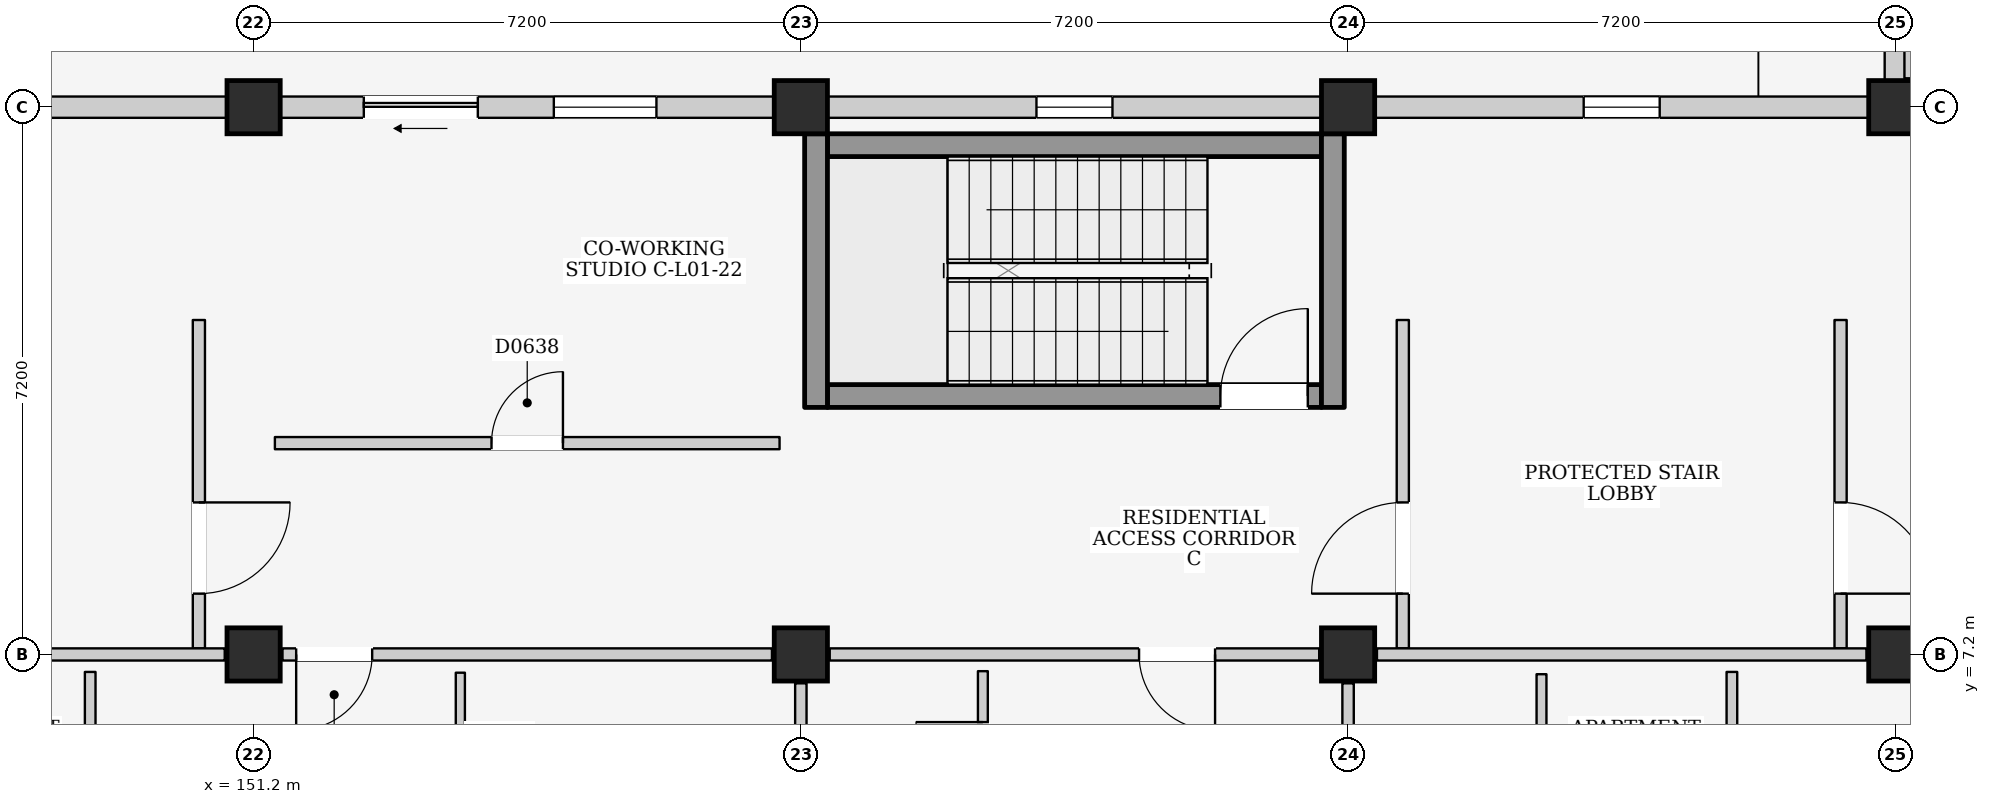
"""IFC4 building model, lengths in metres.
Left out: names, types, materials, properties, quantities, classifications, styles, units other than length and angle.
Written with IfcOpenShell. Run it as: python <this file> out.ifc"""

import sys

from ifc_helpers import new_model, si_unit, direction, frame, frame_2d, origin, origin_2d, place, context, subcontext, project, spatial, rectangle, extrude, element, fill, save


model = new_model("IFC4")
c1 = context("Model", 3, precision=1e-05, world=origin(), true_north=direction((0.0, 1.0)))
c2 = subcontext(c1, "Body", "Model", "MODEL_VIEW")
j1 = project(units=[si_unit("LENGTHUNIT", "METRE"), si_unit("PLANEANGLEUNIT", "RADIAN")], contexts=[c1])
p1 = place(None, origin())
s1 = spatial("IfcSite", under=j1, at=p1, CompositionType="ELEMENT")
p2 = place(p1, origin())
s2 = spatial("IfcBuilding", under=s1, at=p2, CompositionType="ELEMENT")
p3 = place(p2, frame((0.0, 0.0, 4.5)))
s3 = spatial("IfcBuildingStorey", under=s2, at=p3, CompositionType="ELEMENT", Elevation=4.5)
for number, where, z_axis, x_axis in (
    (1, (151.2, 7.2, 0.0), (0.0, 0.0, 1.0), (1.0, 0.0, 0.0)),
    (2, (151.2, 14.4, 0.0), (0.0, 0.0, 1.0), (1.0, 0.0, 0.0)),
    (3, (158.4, 7.2, 0.0), (0.0, 0.0, 1.0), (1.0, 0.0, 0.0)),
    (4, (158.4, 14.4, 0.0), (0.0, 0.0, 1.0), (1.0, 0.0, 0.0)),
    (5, (165.6, 7.2, 0.0), (0.0, 0.0, 1.0), (1.0, 0.0, 0.0)),
    (6, (165.6, 14.4, 0.0), (0.0, 0.0, 1.0), (1.0, 0.0, 0.0)),
    (7, (172.8, 7.2, 0.0), (0.0, 0.0, 1.0), (1.0, 0.0, 0.0)),
    (8, (172.8, 14.4, 0.0), (0.0, 0.0, 1.0), (1.0, 0.0, 0.0)),
):
    element("IfcColumn", number, at=place(p3, frame(where, z_axis=z_axis, x_axis=x_axis)), inside=s3, PredefinedType="COLUMN", context=c2, shape_type="SweptSolid", body=[
        extrude(rectangle(XDim=0.7, YDim=0.7, at=origin_2d()), origin(), (0.0, 0.0, 1.0), 4.5),
    ])
p4 = place(p3, frame((144.35, 14.4, 0.0), z_axis=(0.0, 0.0, 1.0), x_axis=(1.0, 0.0, 0.0)))
e9 = element("IfcWall", 9, at=p4, inside=s3, PredefinedType="ELEMENTEDWALL", context=c2, shape_type="SweptSolid", body=[
    extrude(rectangle(XDim=6.5, YDim=0.28, at=frame_2d((3.25, 0.0))), origin(), (0.0, 0.0, 1.0), 3.635),
])
p5 = place(p4, frame((2.75, 0.0, 1.2)))
e10 = element("IfcOpeningElement", 10, at=p5, cuts=e9, PredefinedType="OPENING", context=c2, shape_type="SweptSolid", body=[
    extrude(rectangle(XDim=1.0, YDim=0.9, at=frame_2d((0.5, 0.45))), frame((0.0, 0.155, 0.0), z_axis=(0.0, -1.0, 0.0), x_axis=(1.0, 0.0, 0.0)), (0.0, 0.0, 1.0), 0.31),
])
p6 = place(p3, frame((151.55, 14.4, 0.0), z_axis=(0.0, 0.0, 1.0), x_axis=(1.0, 0.0, 0.0)))
e11 = element("IfcWall", 11, at=p6, inside=s3, PredefinedType="ELEMENTEDWALL", context=c2, shape_type="SweptSolid", body=[
    extrude(rectangle(XDim=6.5, YDim=0.28, at=frame_2d((3.25, 0.0))), origin(), (0.0, 0.0, 1.0), 3.635),
])
p7 = place(p6, frame((1.1, 0.0, 0.0)))
e12 = element("IfcOpeningElement", 12, at=p7, cuts=e11, PredefinedType="OPENING", context=c2, shape_type="SweptSolid", body=[
    extrude(rectangle(XDim=1.5, YDim=2.12, at=frame_2d((0.75, 1.06))), frame((0.0, 0.155, 0.0), z_axis=(0.0, -1.0, 0.0), x_axis=(1.0, 0.0, 0.0)), (0.0, 0.0, 1.0), 0.31),
])
p8 = place(p6, frame((3.6, 0.0, 0.95)))
e13 = element("IfcOpeningElement", 13, at=p8, cuts=e11, PredefinedType="OPENING", context=c2, shape_type="SweptSolid", body=[
    extrude(rectangle(XDim=1.35, YDim=1.5, at=frame_2d((0.675, 0.75))), frame((0.0, 0.155, 0.0), z_axis=(0.0, -1.0, 0.0), x_axis=(1.0, 0.0, 0.0)), (0.0, 0.0, 1.0), 0.31),
])
p9 = place(p3, frame((158.75, 14.4, 0.0), z_axis=(0.0, 0.0, 1.0), x_axis=(1.0, 0.0, 0.0)))
e14 = element("IfcWall", 14, at=p9, inside=s3, PredefinedType="ELEMENTEDWALL", context=c2, shape_type="SweptSolid", body=[
    extrude(rectangle(XDim=6.5, YDim=0.28, at=frame_2d((3.25, 0.0))), origin(), (0.0, 0.0, 1.0), 3.635),
])
p10 = place(p9, frame((2.75, 0.0, 1.2)))
e15 = element("IfcOpeningElement", 15, at=p10, cuts=e14, PredefinedType="OPENING", context=c2, shape_type="SweptSolid", body=[
    extrude(rectangle(XDim=1.0, YDim=0.9, at=frame_2d((0.5, 0.45))), frame((0.0, 0.155, 0.0), z_axis=(0.0, -1.0, 0.0), x_axis=(1.0, 0.0, 0.0)), (0.0, 0.0, 1.0), 0.31),
])
p11 = place(p3, frame((165.95, 14.4, 0.0), z_axis=(0.0, 0.0, 1.0), x_axis=(1.0, 0.0, 0.0)))
e16 = element("IfcWall", 16, at=p11, inside=s3, PredefinedType="ELEMENTEDWALL", context=c2, shape_type="SweptSolid", body=[
    extrude(rectangle(XDim=6.5, YDim=0.28, at=frame_2d((3.25, 0.0))), origin(), (0.0, 0.0, 1.0), 3.635),
])
p12 = place(p11, frame((2.75, 0.0, 1.2)))
e17 = element("IfcOpeningElement", 17, at=p12, cuts=e16, PredefinedType="OPENING", context=c2, shape_type="SweptSolid", body=[
    extrude(rectangle(XDim=1.0, YDim=0.9, at=frame_2d((0.5, 0.45))), frame((0.0, 0.155, 0.0), z_axis=(0.0, -1.0, 0.0), x_axis=(1.0, 0.0, 0.0)), (0.0, 0.0, 1.0), 0.31),
])
p13 = place(p3, frame((172.8, 14.75, 0.0), z_axis=(0.0, 0.0, 1.0), x_axis=(0.0, 1.0, 0.0)))
e18 = element("IfcWall", 18, at=p13, inside=s3, PredefinedType="ELEMENTEDWALL", context=c2, shape_type="SweptSolid", body=[
    extrude(rectangle(XDim=6.5, YDim=0.28, at=frame_2d((3.25, 0.0))), origin(), (0.0, 0.0, 1.0), 3.685),
])
p14 = place(p13, frame((2.5, 0.0, 0.0)))
e19 = element("IfcOpeningElement", 19, at=p14, cuts=e18, PredefinedType="OPENING", context=c2, shape_type="SweptSolid", body=[
    extrude(rectangle(XDim=1.4, YDim=2.1, at=frame_2d((0.7, 1.05))), frame((0.0, 0.155, 0.0), z_axis=(0.0, -1.0, 0.0), x_axis=(1.0, 0.0, 0.0)), (0.0, 0.0, 1.0), 0.31),
])
p15 = place(p3, frame((150.48, 7.28, 0.0), z_axis=(0.0, 0.0, 1.0), x_axis=(0.0, 1.0, 0.0)))
e20 = element("IfcWall", 20, at=p15, inside=s3, PredefinedType="PARTITIONING", context=c2, shape_type="SweptSolid", body=[
    extrude(rectangle(XDim=4.32, YDim=0.16, at=frame_2d((2.16, 0.0))), origin(), (0.0, 0.0, 1.0), 4.25),
])
p16 = place(p15, frame((0.72, 0.0, 0.0)))
e21 = element("IfcOpeningElement", 21, at=p16, cuts=e20, PredefinedType="OPENING", context=c2, shape_type="SweptSolid", body=[
    extrude(rectangle(XDim=1.2, YDim=2.2, at=frame_2d((0.6, 1.1))), frame((0.0, 0.095, 0.0), z_axis=(0.0, -1.0, 0.0), x_axis=(1.0, 0.0, 0.0)), (0.0, 0.0, 1.0), 0.19),
])
p17 = place(p3, frame((158.75, 10.6, 0.0), z_axis=(0.0, 0.0, 1.0), x_axis=(1.0, 0.0, 0.0)))
e22 = element("IfcWall", 22, at=p17, inside=s3, PredefinedType="SHEAR", context=c2, shape_type="SweptSolid", body=[
    extrude(rectangle(XDim=6.5, YDim=0.3, at=frame_2d((3.25, 0.0))), origin(), (0.0, 0.0, 1.0), 4.25),
])
p18 = place(p17, frame((5.17, 0.0, 0.0)))
e23 = element("IfcOpeningElement", 23, at=p18, cuts=e22, PredefinedType="OPENING", context=c2, shape_type="SweptSolid", body=[
    extrude(rectangle(XDim=1.15, YDim=2.2, at=frame_2d((0.575, 1.1))), frame((0.0, 0.165, 0.0), z_axis=(0.0, -1.0, 0.0), x_axis=(1.0, 0.0, 0.0)), (0.0, 0.0, 1.0), 0.33),
])
p19 = place(p3, frame((158.75, 13.9, 0.0), z_axis=(0.0, 0.0, 1.0), x_axis=(1.0, 0.0, 0.0)))
e24 = element("IfcWall", 24, at=p19, inside=s3, PredefinedType="SHEAR", context=c2, shape_type="SweptSolid", body=[
    extrude(rectangle(XDim=6.5, YDim=0.3, at=frame_2d((3.25, 0.0))), origin(), (0.0, 0.0, 1.0), 4.25),
])
for number, where, z_axis, x_axis in (
    (25, (158.6, 10.45, 0.0), (0.0, 0.0, 1.0), (0.0, 1.0, 0.0)),
    (26, (165.4, 10.45, 0.0), (0.0, 0.0, 1.0), (0.0, 1.0, 0.0)),
):
    element("IfcWall", number, at=place(p3, frame(where, z_axis=z_axis, x_axis=x_axis)), inside=s3, PredefinedType="SHEAR", context=c2, shape_type="SweptSolid", body=[
        extrude(rectangle(XDim=3.6, YDim=0.3, at=frame_2d((1.8, 0.0))), origin(), (0.0, 0.0, 1.0), 4.25),
    ])
p20 = place(p3, frame((166.32, 7.28, 0.0), z_axis=(0.0, 0.0, 1.0), x_axis=(0.0, 1.0, 0.0)))
e27 = element("IfcWall", 27, at=p20, inside=s3, PredefinedType="PARTITIONING", context=c2, shape_type="SweptSolid", body=[
    extrude(rectangle(XDim=4.32, YDim=0.16, at=frame_2d((2.16, 0.0))), origin(), (0.0, 0.0, 1.0), 4.25),
])
p21 = place(p20, frame((0.72, 0.0, 0.0)))
e28 = element("IfcOpeningElement", 28, at=p21, cuts=e27, PredefinedType="OPENING", context=c2, shape_type="SweptSolid", body=[
    extrude(rectangle(XDim=1.2, YDim=2.2, at=frame_2d((0.6, 1.1))), frame((0.0, 0.095, 0.0), z_axis=(0.0, -1.0, 0.0), x_axis=(1.0, 0.0, 0.0)), (0.0, 0.0, 1.0), 0.19),
])
p22 = place(p3, frame((172.08, 7.28, 0.0), z_axis=(0.0, 0.0, 1.0), x_axis=(0.0, 1.0, 0.0)))
e29 = element("IfcWall", 29, at=p22, inside=s3, PredefinedType="PARTITIONING", context=c2, shape_type="SweptSolid", body=[
    extrude(rectangle(XDim=4.32, YDim=0.16, at=frame_2d((2.16, 0.0))), origin(), (0.0, 0.0, 1.0), 4.25),
])
p23 = place(p22, frame((0.72, 0.0, 0.0)))
e30 = element("IfcOpeningElement", 30, at=p23, cuts=e29, PredefinedType="OPENING", context=c2, shape_type="SweptSolid", body=[
    extrude(rectangle(XDim=1.2, YDim=2.2, at=frame_2d((0.6, 1.1))), frame((0.0, 0.095, 0.0), z_axis=(0.0, -1.0, 0.0), x_axis=(1.0, 0.0, 0.0)), (0.0, 0.0, 1.0), 0.19),
])
p24 = place(p3, frame((144.38, 7.2, 0.0), z_axis=(0.0, 0.0, 1.0), x_axis=(1.0, 0.0, 0.0)))
e31 = element("IfcWall", 31, at=p24, inside=s3, PredefinedType="PARTITIONING", context=c2, shape_type="SweptSolid", body=[
    extrude(rectangle(XDim=6.44, YDim=0.16, at=frame_2d((3.22, 0.0))), origin(), (0.0, 0.0, 1.0), 3.635),
])
p25 = place(p3, frame((151.58, 7.2, 0.0), z_axis=(0.0, 0.0, 1.0), x_axis=(1.0, 0.0, 0.0)))
e32 = element("IfcWall", 32, at=p25, inside=s3, PredefinedType="PARTITIONING", context=c2, shape_type="SweptSolid", body=[
    extrude(rectangle(XDim=6.44, YDim=0.16, at=frame_2d((3.22, 0.0))), origin(), (0.0, 0.0, 1.0), 3.635),
])
p26 = place(p25, frame((0.18, 0.0, 0.0)))
e33 = element("IfcOpeningElement", 33, at=p26, cuts=e32, PredefinedType="OPENING", context=c2, shape_type="SweptSolid", body=[
    extrude(rectangle(XDim=1.0, YDim=2.15, at=frame_2d((0.5, 1.075))), frame((0.0, 0.095, 0.0), z_axis=(0.0, -1.0, 0.0), x_axis=(1.0, 0.0, 0.0)), (0.0, 0.0, 1.0), 0.19),
])
p27 = place(p3, frame((158.4, 0.38, 0.0), z_axis=(0.0, 0.0, 1.0), x_axis=(0.0, 1.0, 0.0)))
e34 = element("IfcWall", 34, at=p27, inside=s3, PredefinedType="PARTITIONING", context=c2, shape_type="SweptSolid", body=[
    extrude(rectangle(XDim=6.44, YDim=0.15, at=frame_2d((3.22, 0.0))), origin(), (0.0, 0.0, 1.0), 3.685),
])
p28 = place(p3, frame((149.05, 3.91, 0.0), z_axis=(0.0, 0.0, 1.0), x_axis=(0.0, 1.0, 0.0)))
e35 = element("IfcWall", 35, at=p28, inside=s3, PredefinedType="PARTITIONING", context=c2, shape_type="SweptSolid", body=[
    extrude(rectangle(XDim=3.06, YDim=0.14, at=frame_2d((1.53, 0.0))), origin(), (0.0, 0.0, 1.0), 4.25),
])
p29 = place(p3, frame((153.92, 3.92, 0.0), z_axis=(0.0, 0.0, 1.0), x_axis=(0.0, 1.0, 0.0)))
e36 = element("IfcWall", 36, at=p29, inside=s3, PredefinedType="PARTITIONING", context=c2, shape_type="SweptSolid", body=[
    extrude(rectangle(XDim=3.04, YDim=0.12, at=frame_2d((1.52, 0.0))), origin(), (0.0, 0.0, 1.0), 4.25),
])
p30 = place(p29, frame((1.04, 0.0, 0.0)))
e37 = element("IfcOpeningElement", 37, at=p30, cuts=e36, PredefinedType="OPENING", context=c2, shape_type="SweptSolid", body=[
    extrude(rectangle(XDim=0.96, YDim=2.15, at=frame_2d((0.48, 1.075))), frame((0.0, 0.075, 0.0), z_axis=(0.0, -1.0, 0.0), x_axis=(1.0, 0.0, 0.0)), (0.0, 0.0, 1.0), 0.15),
])
p31 = place(p3, frame((158.78, 7.2, 0.0), z_axis=(0.0, 0.0, 1.0), x_axis=(1.0, 0.0, 0.0)))
e38 = element("IfcWall", 38, at=p31, inside=s3, PredefinedType="PARTITIONING", context=c2, shape_type="SweptSolid", body=[
    extrude(rectangle(XDim=6.44, YDim=0.16, at=frame_2d((3.22, 0.0))), origin(), (0.0, 0.0, 1.0), 3.635),
])
p32 = place(p31, frame((4.07, 0.0, 0.0)))
e39 = element("IfcOpeningElement", 39, at=p32, cuts=e38, PredefinedType="OPENING", context=c2, shape_type="SweptSolid", body=[
    extrude(rectangle(XDim=1.0, YDim=2.15, at=frame_2d((0.5, 1.075))), frame((0.0, 0.095, 0.0), z_axis=(0.0, -1.0, 0.0), x_axis=(1.0, 0.0, 0.0)), (0.0, 0.0, 1.0), 0.19),
])
p33 = place(p3, frame((165.6, 0.38, 0.0), z_axis=(0.0, 0.0, 1.0), x_axis=(0.0, 1.0, 0.0)))
e40 = element("IfcWall", 40, at=p33, inside=s3, PredefinedType="PARTITIONING", context=c2, shape_type="SweptSolid", body=[
    extrude(rectangle(XDim=6.44, YDim=0.15, at=frame_2d((3.22, 0.0))), origin(), (0.0, 0.0, 1.0), 3.685),
])
p34 = place(p3, frame((160.795, 4.76, 0.0), z_axis=(0.0, 0.0, 1.0), x_axis=(0.0, 1.0, 0.0)))
e41 = element("IfcWall", 41, at=p34, inside=s3, PredefinedType="PARTITIONING", context=c2, shape_type="SweptSolid", body=[
    extrude(rectangle(XDim=2.22, YDim=0.13, at=frame_2d((1.11, 0.0))), origin(), (0.0, 0.0, 1.0), 4.25),
])
p35 = place(p34, frame((0.67, 0.0, 0.0)))
e42 = element("IfcOpeningElement", 42, at=p35, cuts=e41, PredefinedType="OPENING", context=c2, shape_type="SweptSolid", body=[
    extrude(rectangle(XDim=0.88, YDim=2.1, at=frame_2d((0.44, 1.05))), frame((0.0, 0.08, 0.0), z_axis=(0.0, -1.0, 0.0), x_axis=(1.0, 0.0, 0.0)), (0.0, 0.0, 1.0), 0.16),
])
p36 = place(p3, frame((165.98, 7.2, 0.0), z_axis=(0.0, 0.0, 1.0), x_axis=(1.0, 0.0, 0.0)))
e43 = element("IfcWall", 43, at=p36, inside=s3, PredefinedType="PARTITIONING", context=c2, shape_type="SweptSolid", body=[
    extrude(rectangle(XDim=6.44, YDim=0.16, at=frame_2d((3.22, 0.0))), origin(), (0.0, 0.0, 1.0), 3.635),
])
p37 = place(p3, frame((168.145, 3.9, 0.0), z_axis=(0.0, 0.0, 1.0), x_axis=(0.0, 1.0, 0.0)))
e44 = element("IfcWall", 44, at=p37, inside=s3, PredefinedType="PARTITIONING", context=c2, shape_type="SweptSolid", body=[
    extrude(rectangle(XDim=3.04, YDim=0.13, at=frame_2d((1.52, 0.0))), origin(), (0.0, 0.0, 1.0), 4.25),
])
p38 = place(p3, frame((170.65, 3.91, 0.0), z_axis=(0.0, 0.0, 1.0), x_axis=(0.0, 1.0, 0.0)))
e45 = element("IfcWall", 45, at=p38, inside=s3, PredefinedType="PARTITIONING", context=c2, shape_type="SweptSolid", body=[
    extrude(rectangle(XDim=3.06, YDim=0.14, at=frame_2d((1.53, 0.0))), origin(), (0.0, 0.0, 1.0), 4.25),
])
p39 = place(p3, frame((151.48, 9.98, 0.0), z_axis=(0.0, 0.0, 1.0), x_axis=(1.0, 0.0, 0.0)))
e46 = element("IfcWall", 46, at=p39, inside=s3, PredefinedType="PARTITIONING", context=c2, shape_type="SweptSolid", body=[
    extrude(rectangle(XDim=6.64, YDim=0.16, at=frame_2d((3.32, 0.0))), origin(), (0.0, 0.0, 1.0), 4.25),
])
p40 = place(p39, frame((2.85, 0.0, 0.0)))
e47 = element("IfcOpeningElement", 47, at=p40, cuts=e46, PredefinedType="OPENING", context=c2, shape_type="SweptSolid", body=[
    extrude(rectangle(XDim=0.94, YDim=2.12, at=frame_2d((0.47, 1.06))), frame((0.0, 0.095, 0.0), z_axis=(0.0, -1.0, 0.0), x_axis=(1.0, 0.0, 0.0)), (0.0, 0.0, 1.0), 0.19),
])
p41 = place(p3, frame((173.0, 14.78, 0.0), z_axis=(0.0, 0.0, 1.0), x_axis=(0.0, 1.0, 0.0)))
e48 = element("IfcWall", 48, at=p41, inside=s3, PredefinedType="PARTITIONING", context=c2, shape_type="SweptSolid", body=[
    extrude(rectangle(XDim=6.44, YDim=0.16, at=frame_2d((3.22, 0.0))), origin(), (0.0, 0.0, 1.0), 3.685),
])
p42 = place(p41, frame((2.71, 0.0, 0.0)))
e49 = element("IfcOpeningElement", 49, at=p42, cuts=e48, PredefinedType="OPENING", context=c2, shape_type="SweptSolid", body=[
    extrude(rectangle(XDim=1.02, YDim=2.18, at=frame_2d((0.51, 1.09))), frame((0.0, 0.095, 0.0), z_axis=(0.0, -1.0, 0.0), x_axis=(1.0, 0.0, 0.0)), (0.0, 0.0, 1.0), 0.19),
])
p43 = place(p7, frame((1.5, 0.0, 0.0), z_axis=(0.0, 0.0, 1.0), x_axis=(-1.0, 0.0, 0.0)))
e50 = element("IfcDoor", 50, at=p43, inside=s3, OperationType="SLIDING_TO_LEFT", PredefinedType="DOOR", context=c2, shape_type="SweptSolid", body=[
    extrude(rectangle(XDim=1.5, YDim=2.12, at=frame_2d((0.75, 1.06))), frame((0.0, 0.025, 0.0), z_axis=(0.0, -1.0, 0.0), x_axis=(1.0, 0.0, 0.0)), (0.0, 0.0, 1.0), 0.05),
])
fill(e12, e50)
p44 = place(p8, origin())
e51 = element("IfcWindow", 51, at=p44, inside=s3, PartitioningType="SINGLE_PANEL", PredefinedType="WINDOW", context=c2, shape_type="SweptSolid", body=[
    extrude(rectangle(XDim=1.35, YDim=1.5, at=frame_2d((0.675, 0.75))), frame((0.0, 0.03, 0.0), z_axis=(0.0, -1.0, 0.0), x_axis=(1.0, 0.0, 0.0)), (0.0, 0.0, 1.0), 0.06),
])
fill(e13, e51)
p45 = place(p10, origin())
e52 = element("IfcWindow", 52, at=p45, inside=s3, PartitioningType="SINGLE_PANEL", PredefinedType="WINDOW", context=c2, shape_type="SweptSolid", body=[
    extrude(rectangle(XDim=1.0, YDim=0.9, at=frame_2d((0.5, 0.45))), frame((0.0, 0.03, 0.0), z_axis=(0.0, -1.0, 0.0), x_axis=(1.0, 0.0, 0.0)), (0.0, 0.0, 1.0), 0.06),
])
fill(e15, e52)
p46 = place(p12, origin())
e53 = element("IfcWindow", 53, at=p46, inside=s3, PartitioningType="SINGLE_PANEL", PredefinedType="WINDOW", context=c2, shape_type="SweptSolid", body=[
    extrude(rectangle(XDim=1.0, YDim=0.9, at=frame_2d((0.5, 0.45))), frame((0.0, 0.03, 0.0), z_axis=(0.0, -1.0, 0.0), x_axis=(1.0, 0.0, 0.0)), (0.0, 0.0, 1.0), 0.06),
])
fill(e17, e53)
p47 = place(p16, frame((1.2, 0.0, 0.0), z_axis=(0.0, 0.0, 1.0), x_axis=(-1.0, 0.0, 0.0)))
e54 = element("IfcDoor", 54, at=p47, inside=s3, OperationType="SINGLE_SWING_LEFT", PredefinedType="DOOR", context=c2, shape_type="SweptSolid", body=[
    extrude(rectangle(XDim=1.2, YDim=2.2, at=frame_2d((0.6, 1.1))), frame((0.0, 0.025, 0.0), z_axis=(0.0, -1.0, 0.0), x_axis=(1.0, 0.0, 0.0)), (0.0, 0.0, 1.0), 0.05),
])
fill(e21, e54)
p48 = place(p18, origin())
e55 = element("IfcDoor", 55, at=p48, inside=s3, OperationType="SINGLE_SWING_RIGHT", PredefinedType="DOOR", context=c2, shape_type="SweptSolid", body=[
    extrude(rectangle(XDim=1.15, YDim=2.2, at=frame_2d((0.575, 1.1))), frame((0.0, 0.025, 0.0), z_axis=(0.0, -1.0, 0.0), x_axis=(1.0, 0.0, 0.0)), (0.0, 0.0, 1.0), 0.05),
])
fill(e23, e55)
p49 = place(p21, origin())
e56 = element("IfcDoor", 56, at=p49, inside=s3, OperationType="SINGLE_SWING_LEFT", PredefinedType="DOOR", context=c2, shape_type="SweptSolid", body=[
    extrude(rectangle(XDim=1.2, YDim=2.2, at=frame_2d((0.6, 1.1))), frame((0.0, 0.025, 0.0), z_axis=(0.0, -1.0, 0.0), x_axis=(1.0, 0.0, 0.0)), (0.0, 0.0, 1.0), 0.05),
])
fill(e28, e56)
p50 = place(p23, frame((1.2, 0.0, 0.0), z_axis=(0.0, 0.0, 1.0), x_axis=(-1.0, 0.0, 0.0)))
e57 = element("IfcDoor", 57, at=p50, inside=s3, OperationType="SINGLE_SWING_RIGHT", PredefinedType="DOOR", context=c2, shape_type="SweptSolid", body=[
    extrude(rectangle(XDim=1.2, YDim=2.2, at=frame_2d((0.6, 1.1))), frame((0.0, 0.025, 0.0), z_axis=(0.0, -1.0, 0.0), x_axis=(1.0, 0.0, 0.0)), (0.0, 0.0, 1.0), 0.05),
])
fill(e30, e57)
p51 = place(p26, frame((1.0, 0.0, 0.0), z_axis=(0.0, 0.0, 1.0), x_axis=(-1.0, 0.0, 0.0)))
e58 = element("IfcDoor", 58, at=p51, inside=s3, OperationType="SINGLE_SWING_RIGHT", PredefinedType="DOOR", context=c2, shape_type="SweptSolid", body=[
    extrude(rectangle(XDim=1.0, YDim=2.15, at=frame_2d((0.5, 1.075))), frame((0.0, 0.025, 0.0), z_axis=(0.0, -1.0, 0.0), x_axis=(1.0, 0.0, 0.0)), (0.0, 0.0, 1.0), 0.05),
])
fill(e33, e58)
p52 = place(p32, frame((1.0, 0.0, 0.0), z_axis=(0.0, 0.0, 1.0), x_axis=(-1.0, 0.0, 0.0)))
e59 = element("IfcDoor", 59, at=p52, inside=s3, OperationType="SINGLE_SWING_LEFT", PredefinedType="DOOR", context=c2, shape_type="SweptSolid", body=[
    extrude(rectangle(XDim=1.0, YDim=2.15, at=frame_2d((0.5, 1.075))), frame((0.0, 0.025, 0.0), z_axis=(0.0, -1.0, 0.0), x_axis=(1.0, 0.0, 0.0)), (0.0, 0.0, 1.0), 0.05),
])
fill(e39, e59)
p53 = place(p35, origin())
e60 = element("IfcDoor", 60, at=p53, inside=s3, OperationType="SINGLE_SWING_RIGHT", PredefinedType="DOOR", context=c2, shape_type="SweptSolid", body=[
    extrude(rectangle(XDim=0.88, YDim=2.1, at=frame_2d((0.44, 1.05))), frame((0.0, 0.025, 0.0), z_axis=(0.0, -1.0, 0.0), x_axis=(1.0, 0.0, 0.0)), (0.0, 0.0, 1.0), 0.05),
])
fill(e42, e60)
p54 = place(p40, origin())
e61 = element("IfcDoor", 61, at=p54, inside=s3, OperationType="SINGLE_SWING_RIGHT", PredefinedType="DOOR", context=c2, shape_type="SweptSolid", body=[
    extrude(rectangle(XDim=0.94, YDim=2.12, at=frame_2d((0.47, 1.06))), frame((0.0, 0.025, 0.0), z_axis=(0.0, -1.0, 0.0), x_axis=(1.0, 0.0, 0.0)), (0.0, 0.0, 1.0), 0.05),
])
fill(e47, e61)
save(model, sys.argv[1])
